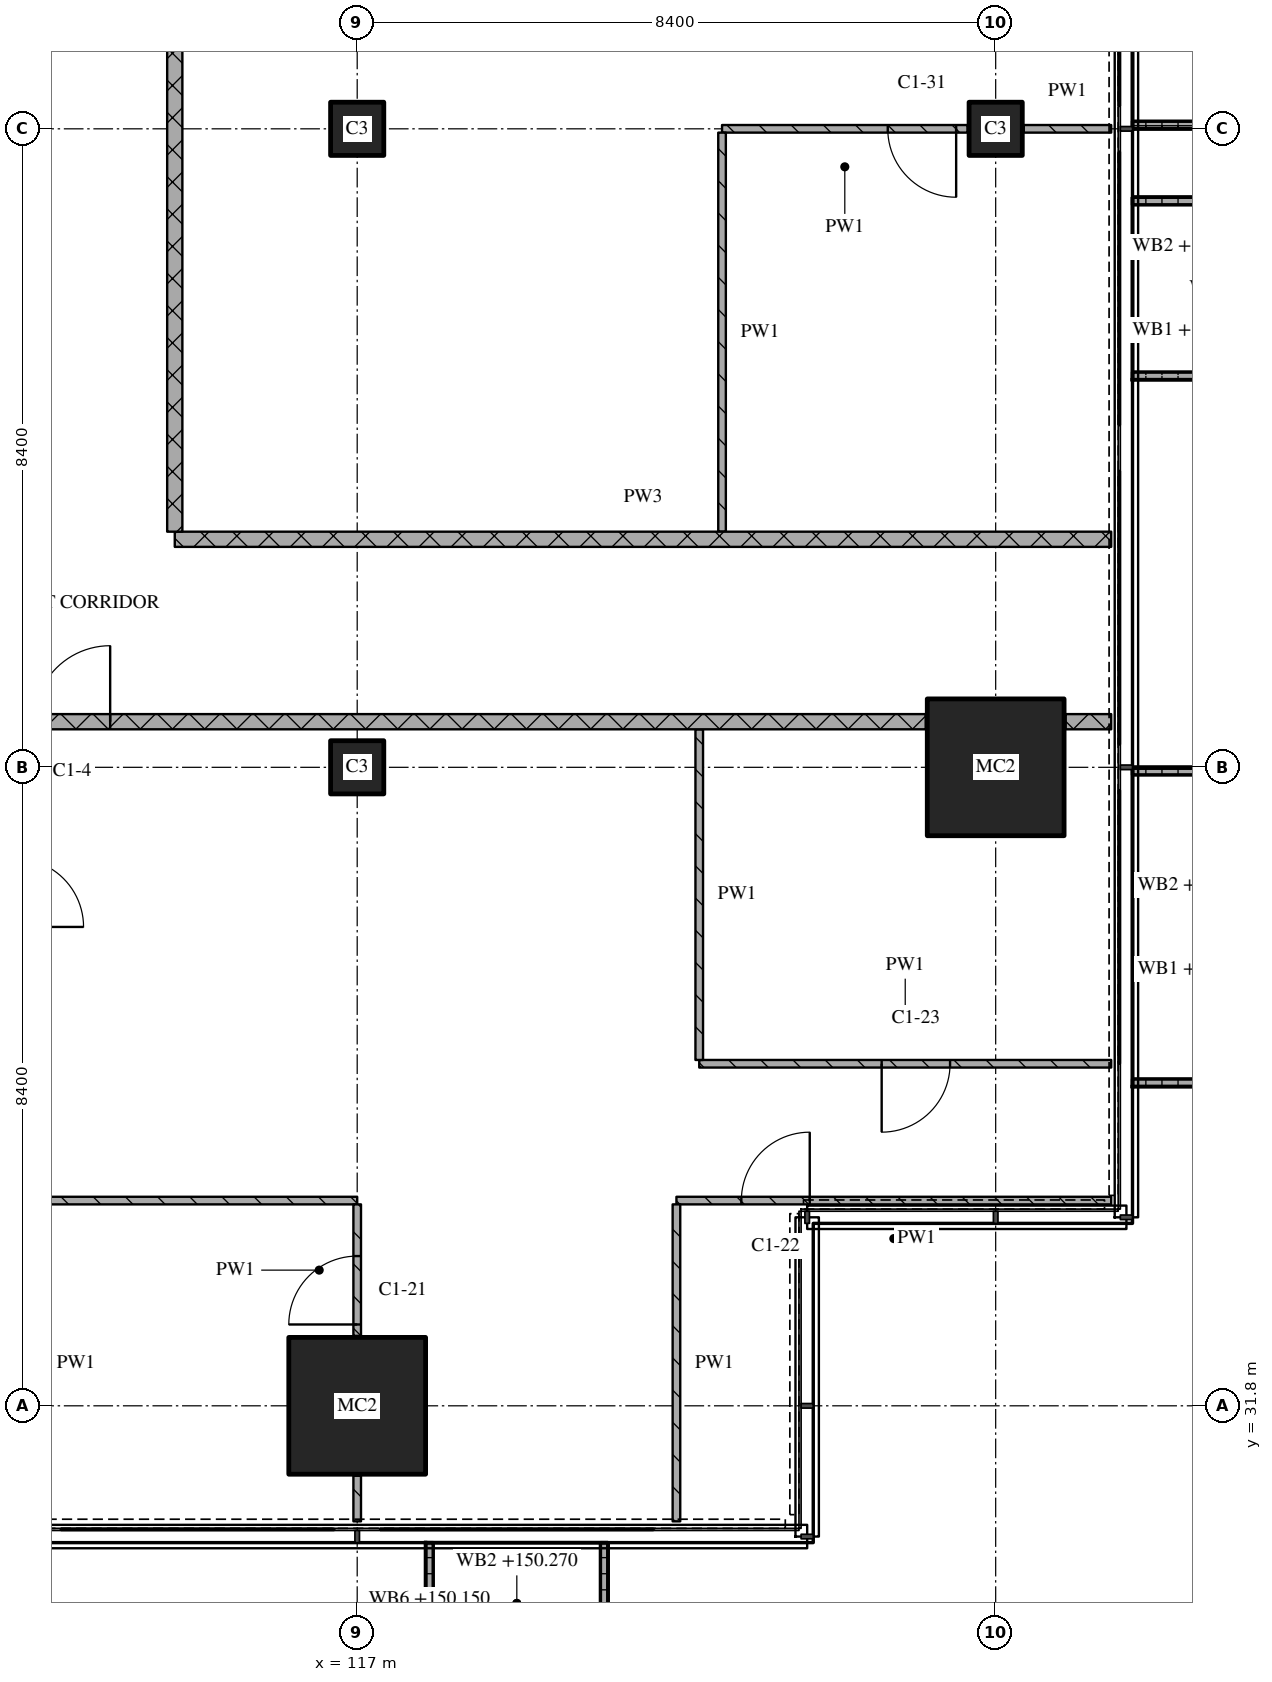
"""IFC4 building model, lengths in metres.
Left out: names, types, materials, properties, quantities, classifications, styles, units other than length and angle.
Written with IfcOpenShell. Run it as: python <this file> out.ifc"""

import sys

from ifc_helpers import new_model, si_unit, direction, frame, frame_2d, origin, origin_2d, place, context, subcontext, project, spatial, polyline, rectangle, outline, extrude, element, fill, save


model = new_model("IFC4")
c1 = context("Model", 3, precision=1e-05, world=origin(), true_north=direction((0.0, 1.0)))
c2 = subcontext(c1, "Body", "Model", "MODEL_VIEW")
j1 = project(units=[si_unit("LENGTHUNIT", "METRE"), si_unit("PLANEANGLEUNIT", "RADIAN")], contexts=[c1])
p1 = place(None, origin())
s1 = spatial("IfcSite", under=j1, at=p1, CompositionType="ELEMENT")
p2 = place(p1, origin())
s2 = spatial("IfcBuilding", under=s1, at=p2, CompositionType="ELEMENT")
p3 = place(p2, frame((0.0, 0.0, 147.45)))
s3 = spatial("IfcBuildingStorey", under=s2, at=p3, CompositionType="ELEMENT", Elevation=147.45)
p4 = place(p3, frame((117.0, 31.8, 0.0), z_axis=(0.0, 0.0, 1.0), x_axis=(1.0, 0.0, 0.0)))
e1 = element("IfcColumn", 1, at=p4, inside=s3, PredefinedType="COLUMN", context=c2, shape_type="SweptSolid", body=[
    extrude(rectangle(XDim=1.8, YDim=1.8, at=origin_2d()), origin(), (0.0, 0.0, 1.0), 3.6),
])
for number, where, z_axis, x_axis in (
    (2, (117.0, 40.2, 0.0), (0.0, 0.0, 1.0), (1.0, 0.0, 0.0)),
    (3, (117.0, 48.6, 0.0), (0.0, 0.0, 1.0), (1.0, 0.0, 0.0)),
):
    element("IfcColumn", number, at=place(p3, frame(where, z_axis=z_axis, x_axis=x_axis)), inside=s3, PredefinedType="COLUMN", context=c2, shape_type="SweptSolid", body=[
        extrude(rectangle(XDim=0.7, YDim=0.7, at=origin_2d()), origin(), (0.0, 0.0, 1.0), 3.6),
    ])
p5 = place(p3, frame((125.4, 40.2, 0.0), z_axis=(0.0, 0.0, 1.0), x_axis=(1.0, 0.0, 0.0)))
e4 = element("IfcColumn", 4, at=p5, inside=s3, PredefinedType="COLUMN", context=c2, shape_type="SweptSolid", body=[
    extrude(rectangle(XDim=1.8, YDim=1.8, at=origin_2d()), origin(), (0.0, 0.0, 1.0), 3.6),
])
p6 = place(p3, frame((125.4, 48.6, 0.0), z_axis=(0.0, 0.0, 1.0), x_axis=(1.0, 0.0, 0.0)))
e5 = element("IfcColumn", 5, at=p6, inside=s3, PredefinedType="COLUMN", context=c2, shape_type="SweptSolid", body=[
    extrude(rectangle(XDim=0.7, YDim=0.7, at=origin_2d()), origin(), (0.0, 0.0, 1.0), 3.6),
])
p7 = place(p3, origin())
e6 = element("IfcWall", 6, at=p7, inside=s3, PredefinedType="SOLIDWALL", context=c2, shape_type="SweptSolid", body=[
    extrude(outline(polyline([(117.9, 30.0), (118.0, 30.0), (118.0, 28.5), (120.2, 28.5), (120.2, 30.0), (120.3, 30.0), (120.3, 28.4), (117.9, 28.4), (117.9, 30.0)])), origin(), (0.0, 0.0, 1.0), 1.0),
])
p8 = place(p3, origin())
e7 = element("IfcWall", 7, at=p8, inside=s3, PredefinedType="SOLIDWALL", context=c2, shape_type="SweptSolid", body=[
    extrude(outline(polyline([(127.2, 36.0), (127.2, 36.1), (128.833, 36.1), (128.833, 40.1), (127.2, 40.1), (127.2, 40.2), (128.933, 40.2), (128.933, 36.0), (127.2, 36.0)])), origin(), (0.0, 0.0, 1.0), 1.0),
])
p9 = place(p3, origin())
e8 = element("IfcWall", 8, at=p9, inside=s3, PredefinedType="SOLIDWALL", context=c2, shape_type="SweptSolid", body=[
    extrude(outline(polyline([(127.2, 45.3), (127.2, 45.4), (128.7, 45.4), (128.7, 47.6), (127.2, 47.6), (127.2, 47.7), (128.8, 47.7), (128.8, 45.3), (127.2, 45.3)])), origin(), (0.0, 0.0, 1.0), 1.0),
])
p10 = place(p3, origin())
e9 = element("IfcWall", 9, at=p10, inside=s3, PredefinedType="SOLIDWALL", context=c2, shape_type="SweptSolid", body=[
    extrude(outline(polyline([(127.2, 48.6), (127.2, 48.7), (128.833, 48.7), (128.833, 52.7), (127.2, 52.7), (127.2, 52.8), (128.933, 52.8), (128.933, 48.6), (127.2, 48.6)])), origin(), (0.0, 0.0, 1.0), 1.0),
])
p11 = place(p3, frame((117.0, 34.5, 0.0), z_axis=(0.0, 0.0, 1.0), x_axis=(-1.0, 0.0, 0.0)))
e10 = element("IfcWall", 10, at=p11, inside=s3, PredefinedType="PARTITIONING", context=c2, shape_type="SweptSolid", body=[
    extrude(rectangle(XDim=16.7, YDim=0.1, at=frame_2d((8.35, 0.0))), origin(), (0.0, 0.0, 1.0), 3.32),
])
p12 = place(p11, frame((7.95, 0.0, 0.0)))
e11 = element("IfcOpeningElement", 11, at=p12, cuts=e10, PredefinedType="OPENING", context=c2, shape_type="SweptSolid", body=[
    extrude(rectangle(XDim=0.9, YDim=2.1, at=frame_2d((0.45, 1.05))), frame((0.0, 0.06, 0.0), z_axis=(0.0, -1.0, 0.0), x_axis=(1.0, 0.0, 0.0)), (0.0, 0.0, 1.0), 0.12),
])
p13 = place(p11, frame((14.25, 0.0, 0.0)))
e12 = element("IfcOpeningElement", 12, at=p13, cuts=e10, PredefinedType="OPENING", context=c2, shape_type="SweptSolid", body=[
    extrude(rectangle(XDim=0.9, YDim=2.1, at=frame_2d((0.45, 1.05))), frame((0.0, 0.06, 0.0), z_axis=(0.0, -1.0, 0.0), x_axis=(1.0, 0.0, 0.0)), (0.0, 0.0, 1.0), 0.12),
])
p14 = place(p3, frame((126.92, 34.5, 0.0), z_axis=(0.0, 0.0, 1.0), x_axis=(-1.0, 0.0, 0.0)))
e13 = element("IfcWall", 13, at=p14, inside=s3, PredefinedType="PARTITIONING", context=c2, shape_type="SweptSolid", body=[
    extrude(rectangle(XDim=5.72, YDim=0.1, at=frame_2d((2.86, 0.0))), origin(), (0.0, 0.0, 1.0), 3.32),
])
p15 = place(p14, frame((3.966, 0.0, 0.0)))
e14 = element("IfcOpeningElement", 14, at=p15, cuts=e13, PredefinedType="OPENING", context=c2, shape_type="SweptSolid", body=[
    extrude(rectangle(XDim=0.9, YDim=2.1, at=frame_2d((0.45, 1.05))), frame((0.0, 0.06, 0.0), z_axis=(0.0, -1.0, 0.0), x_axis=(1.0, 0.0, 0.0)), (0.0, 0.0, 1.0), 0.12),
])
p16 = place(p3, frame((121.5, 36.3, 0.0), z_axis=(0.0, 0.0, 1.0), x_axis=(1.0, 0.0, 0.0)))
e15 = element("IfcWall", 15, at=p16, inside=s3, PredefinedType="PARTITIONING", context=c2, shape_type="SweptSolid", body=[
    extrude(rectangle(XDim=5.42, YDim=0.1, at=frame_2d((2.71, 0.0))), origin(), (0.0, 0.0, 1.0), 3.32),
])
p17 = place(p16, frame((2.4, 0.0, 0.0)))
e16 = element("IfcOpeningElement", 16, at=p17, cuts=e15, PredefinedType="OPENING", context=c2, shape_type="SweptSolid", body=[
    extrude(rectangle(XDim=0.9, YDim=2.1, at=frame_2d((0.45, 1.05))), frame((0.0, 0.06, 0.0), z_axis=(0.0, -1.0, 0.0), x_axis=(1.0, 0.0, 0.0)), (0.0, 0.0, 1.0), 0.12),
])
p18 = place(p3, frame((124.48, 40.8, 0.0), z_axis=(0.0, 0.0, 1.0), x_axis=(-1.0, 0.0, 0.0)))
e17 = element("IfcWall", 17, at=p18, inside=s3, PredefinedType="PARTITIONING", context=c2, shape_type="SweptSolid", body=[
    extrude(rectangle(XDim=24.28, YDim=0.2, at=frame_2d((12.14, 0.0))), origin(), (0.0, 0.0, 1.0), 3.32),
])
p19 = place(p18, frame((10.73, 0.0, 0.0)))
e18 = element("IfcOpeningElement", 18, at=p19, cuts=e17, PredefinedType="OPENING", context=c2, shape_type="SweptSolid", body=[
    extrude(rectangle(XDim=1.0, YDim=2.1, at=frame_2d((0.5, 1.05))), frame((0.0, 0.11, 0.0), z_axis=(0.0, -1.0, 0.0), x_axis=(1.0, 0.0, 0.0)), (0.0, 0.0, 1.0), 0.22),
])
p20 = place(p3, frame((126.32, 40.8, 0.0), z_axis=(0.0, 0.0, 1.0), x_axis=(1.0, 0.0, 0.0)))
e19 = element("IfcWall", 19, at=p20, inside=s3, PredefinedType="PARTITIONING", context=c2, shape_type="SweptSolid", body=[
    extrude(rectangle(XDim=0.6, YDim=0.2, at=frame_2d((0.3, 0.0))), origin(), (0.0, 0.0, 1.0), 3.32),
])
p21 = place(p3, frame((114.6, 43.2, 0.0), z_axis=(0.0, 0.0, 1.0), x_axis=(1.0, 0.0, 0.0)))
e20 = element("IfcWall", 20, at=p21, inside=s3, PredefinedType="PARTITIONING", context=c2, shape_type="SweptSolid", body=[
    extrude(rectangle(XDim=12.32, YDim=0.2, at=frame_2d((6.16, 0.0))), origin(), (0.0, 0.0, 1.0), 3.32),
])
p22 = place(p3, frame((125.03, 48.6, 0.0), z_axis=(0.0, 0.0, 1.0), x_axis=(-1.0, 0.0, 0.0)))
e21 = element("IfcWall", 21, at=p22, inside=s3, PredefinedType="PARTITIONING", context=c2, shape_type="SweptSolid", body=[
    extrude(rectangle(XDim=3.23, YDim=0.1, at=frame_2d((1.615, 0.0))), origin(), (0.0, 0.0, 1.0), 3.32),
])
p23 = place(p22, frame((0.15, 0.0, 0.0)))
e22 = element("IfcOpeningElement", 22, at=p23, cuts=e21, PredefinedType="OPENING", context=c2, shape_type="SweptSolid", body=[
    extrude(rectangle(XDim=0.9, YDim=2.1, at=frame_2d((0.45, 1.05))), frame((0.0, 0.06, 0.0), z_axis=(0.0, -1.0, 0.0), x_axis=(1.0, 0.0, 0.0)), (0.0, 0.0, 1.0), 0.12),
])
p24 = place(p3, frame((125.77, 48.6, 0.0), z_axis=(0.0, 0.0, 1.0), x_axis=(1.0, 0.0, 0.0)))
e23 = element("IfcWall", 23, at=p24, inside=s3, PredefinedType="PARTITIONING", context=c2, shape_type="SweptSolid", body=[
    extrude(rectangle(XDim=1.15, YDim=0.1, at=frame_2d((0.575, 0.0))), origin(), (0.0, 0.0, 1.0), 3.32),
])
p25 = place(p3, frame((114.6, 61.1, 0.0), z_axis=(0.0, 0.0, 1.0), x_axis=(0.0, -1.0, 0.0)))
e24 = element("IfcWall", 24, at=p25, inside=s3, PredefinedType="PARTITIONING", context=c2, shape_type="SweptSolid", body=[
    extrude(rectangle(XDim=17.8, YDim=0.2, at=frame_2d((8.9, 0.0))), origin(), (0.0, 0.0, 1.0), 3.32),
])
p26 = place(p25, frame((4.65, 0.0, 0.0)))
e25 = element("IfcOpeningElement", 25, at=p26, cuts=e24, PredefinedType="OPENING", context=c2, shape_type="SweptSolid", body=[
    extrude(rectangle(XDim=1.0, YDim=2.1, at=frame_2d((0.5, 1.05))), frame((0.0, 0.11, 0.0), z_axis=(0.0, -1.0, 0.0), x_axis=(1.0, 0.0, 0.0)), (0.0, 0.0, 1.0), 0.22),
])
p27 = place(p3, frame((117.0, 30.88, 0.0), z_axis=(0.0, 0.0, 1.0), x_axis=(0.0, -1.0, 0.0)))
e26 = element("IfcWall", 26, at=p27, inside=s3, PredefinedType="PARTITIONING", context=c2, shape_type="SweptSolid", body=[
    extrude(rectangle(XDim=0.6, YDim=0.1, at=frame_2d((0.3, 0.0))), origin(), (0.0, 0.0, 1.0), 3.32),
])
p28 = place(p3, frame((117.0, 32.72, 0.0), z_axis=(0.0, 0.0, 1.0), x_axis=(0.0, 1.0, 0.0)))
e27 = element("IfcWall", 27, at=p28, inside=s3, PredefinedType="PARTITIONING", context=c2, shape_type="SweptSolid", body=[
    extrude(rectangle(XDim=1.73, YDim=0.1, at=frame_2d((0.865, 0.0))), origin(), (0.0, 0.0, 1.0), 3.32),
])
p29 = place(p28, frame((0.15, 0.0, 0.0)))
e28 = element("IfcOpeningElement", 28, at=p29, cuts=e27, PredefinedType="OPENING", context=c2, shape_type="SweptSolid", body=[
    extrude(rectangle(XDim=0.9, YDim=2.1, at=frame_2d((0.45, 1.05))), frame((0.0, 0.06, 0.0), z_axis=(0.0, -1.0, 0.0), x_axis=(1.0, 0.0, 0.0)), (0.0, 0.0, 1.0), 0.12),
])
p30 = place(p3, frame((121.2, 34.45, 0.0), z_axis=(0.0, 0.0, 1.0), x_axis=(0.0, -1.0, 0.0)))
e29 = element("IfcWall", 29, at=p30, inside=s3, PredefinedType="PARTITIONING", context=c2, shape_type="SweptSolid", body=[
    extrude(rectangle(XDim=4.17, YDim=0.1, at=frame_2d((2.085, 0.0))), origin(), (0.0, 0.0, 1.0), 3.32),
])
p31 = place(p3, frame((121.5, 40.7, 0.0), z_axis=(0.0, 0.0, 1.0), x_axis=(0.0, -1.0, 0.0)))
e30 = element("IfcWall", 30, at=p31, inside=s3, PredefinedType="PARTITIONING", context=c2, shape_type="SweptSolid", body=[
    extrude(rectangle(XDim=4.35, YDim=0.1, at=frame_2d((2.175, 0.0))), origin(), (0.0, 0.0, 1.0), 3.32),
])
p32 = place(p3, frame((121.8, 48.55, 0.0), z_axis=(0.0, 0.0, 1.0), x_axis=(0.0, -1.0, 0.0)))
e31 = element("IfcWall", 31, at=p32, inside=s3, PredefinedType="PARTITIONING", context=c2, shape_type="SweptSolid", body=[
    extrude(rectangle(XDim=5.25, YDim=0.1, at=frame_2d((2.625, 0.0))), origin(), (0.0, 0.0, 1.0), 3.32),
])
p33 = place(p15, origin())
e32 = element("IfcDoor", 32, at=p33, inside=s3, OperationType="SINGLE_SWING_RIGHT", PredefinedType="DOOR", context=c2, shape_type="SweptSolid", body=[
    extrude(rectangle(XDim=0.9, YDim=2.1, at=frame_2d((0.45, 1.05))), frame((0.0, 0.025, 0.0), z_axis=(0.0, -1.0, 0.0), x_axis=(1.0, 0.0, 0.0)), (0.0, 0.0, 1.0), 0.05),
])
fill(e14, e32)
p34 = place(p17, origin())
e33 = element("IfcDoor", 33, at=p34, inside=s3, OperationType="SINGLE_SWING_RIGHT", PredefinedType="DOOR", context=c2, shape_type="SweptSolid", body=[
    extrude(rectangle(XDim=0.9, YDim=2.1, at=frame_2d((0.45, 1.05))), frame((0.0, 0.025, 0.0), z_axis=(0.0, -1.0, 0.0), x_axis=(1.0, 0.0, 0.0)), (0.0, 0.0, 1.0), 0.05),
])
fill(e16, e33)
p35 = place(p19, origin())
e34 = element("IfcDoor", 34, at=p35, inside=s3, OperationType="SINGLE_SWING_RIGHT", PredefinedType="DOOR", context=c2, shape_type="SweptSolid", body=[
    extrude(rectangle(XDim=1.0, YDim=2.1, at=frame_2d((0.5, 1.05))), frame((0.0, 0.025, 0.0), z_axis=(0.0, -1.0, 0.0), x_axis=(1.0, 0.0, 0.0)), (0.0, 0.0, 1.0), 0.05),
])
fill(e18, e34)
p36 = place(p23, origin())
e35 = element("IfcDoor", 35, at=p36, inside=s3, OperationType="SINGLE_SWING_LEFT", PredefinedType="DOOR", context=c2, shape_type="SweptSolid", body=[
    extrude(rectangle(XDim=0.9, YDim=2.1, at=frame_2d((0.45, 1.05))), frame((0.0, 0.025, 0.0), z_axis=(0.0, -1.0, 0.0), x_axis=(1.0, 0.0, 0.0)), (0.0, 0.0, 1.0), 0.05),
])
fill(e22, e35)
p37 = place(p29, origin())
e36 = element("IfcDoor", 36, at=p37, inside=s3, OperationType="SINGLE_SWING_LEFT", PredefinedType="DOOR", context=c2, shape_type="SweptSolid", body=[
    extrude(rectangle(XDim=0.9, YDim=2.1, at=frame_2d((0.45, 1.05))), frame((0.0, 0.025, 0.0), z_axis=(0.0, -1.0, 0.0), x_axis=(1.0, 0.0, 0.0)), (0.0, 0.0, 1.0), 0.05),
])
fill(e28, e36)
save(model, sys.argv[1])
